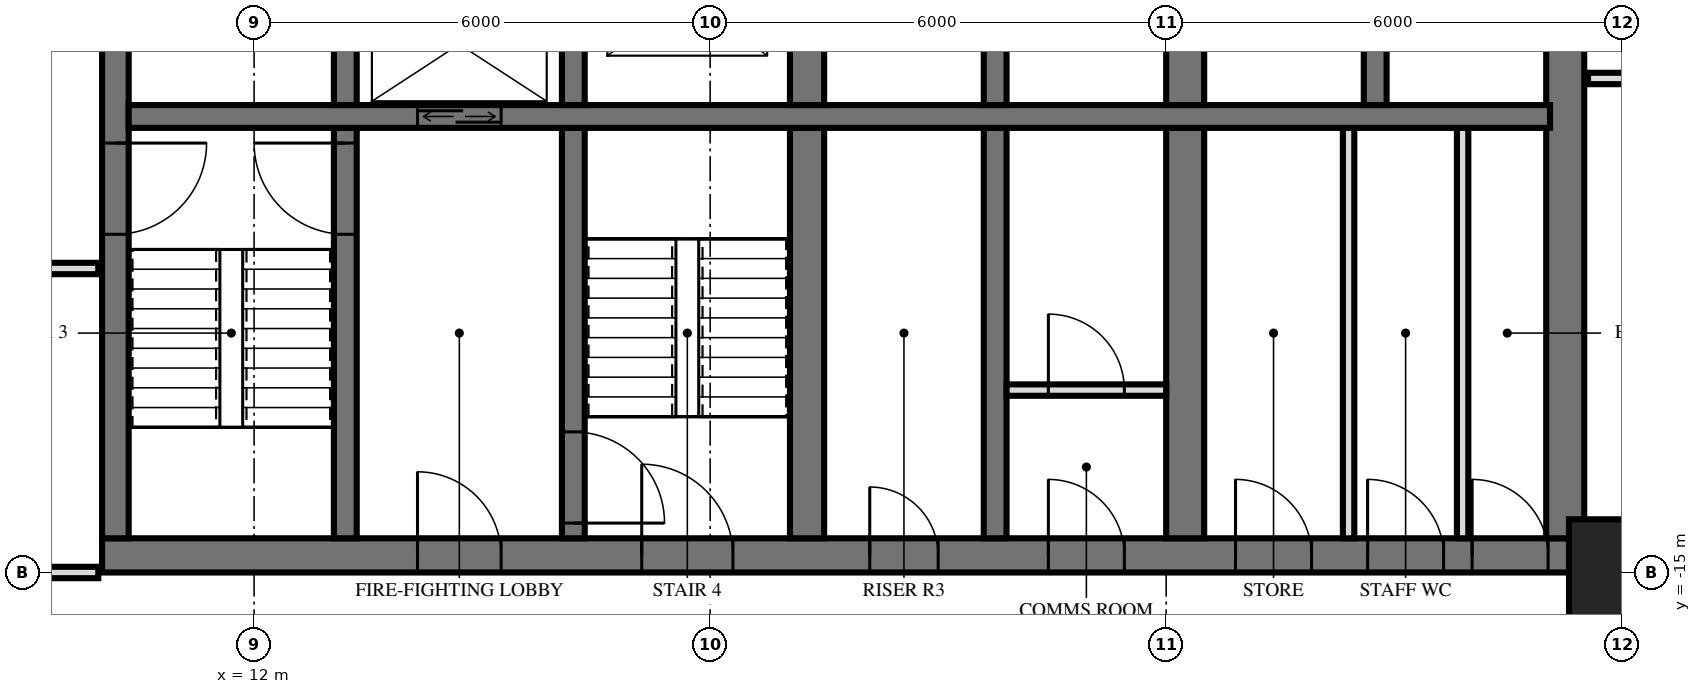
"""IFC4 building model, lengths in metres.
Left out: names, types, materials, properties, quantities, classifications, styles, units other than length and angle.
Written with IfcOpenShell. Run it as: python <this file> out.ifc"""

import sys

from ifc_helpers import new_model, si_unit, direction, frame, frame_2d, origin, origin_2d, place, context, subcontext, project, spatial, rectangle, extrude, element, fill, save


model = new_model("IFC4")
c1 = context("Model", 3, precision=1e-05, world=origin(), true_north=direction((0.0, 1.0)))
c2 = subcontext(c1, "Body", "Model", "MODEL_VIEW")
j1 = project(units=[si_unit("LENGTHUNIT", "METRE"), si_unit("PLANEANGLEUNIT", "RADIAN")], contexts=[c1])
p1 = place(None, origin())
s1 = spatial("IfcSite", under=j1, at=p1, CompositionType="ELEMENT")
p2 = place(p1, origin())
s2 = spatial("IfcBuilding", under=s1, at=p2, CompositionType="ELEMENT")
p3 = place(p2, frame((0.0, 0.0, 85.2)))
s3 = spatial("IfcBuildingStorey", under=s2, at=p3, CompositionType="ELEMENT", Elevation=85.2)
p4 = place(p3, frame((30.0, -15.0, 0.0), z_axis=(0.0, 0.0, 1.0), x_axis=(1.0, 0.0, 0.0)))
e1 = element("IfcColumn", 1, at=p4, inside=s3, PredefinedType="COLUMN", context=c2, shape_type="SweptSolid", body=[
    extrude(rectangle(XDim=1.4, YDim=1.4, at=origin_2d()), origin(), (0.0, 0.0, 1.0), 3.6),
])
p5 = place(p3, frame((10.0, -14.775, 0.0), z_axis=(0.0, 0.0, 1.0), x_axis=(1.0, 0.0, 0.0)))
e2 = element("IfcWall", 2, at=p5, inside=s3, PredefinedType="SHEAR", context=c2, shape_type="SweptSolid", body=[
    extrude(rectangle(XDim=19.5, YDim=0.45, at=frame_2d((9.75, 0.0))), origin(), (0.0, 0.0, 1.0), 3.6),
])
p6 = place(p5, frame((7.1, 0.0, 0.0)))
e3 = element("IfcOpeningElement", 3, at=p6, cuts=e2, PredefinedType="OPENING", context=c2, shape_type="SweptSolid", body=[
    extrude(rectangle(XDim=1.2, YDim=2.1, at=frame_2d((0.6, 1.05))), frame((0.0, 0.235, 0.0), z_axis=(0.0, -1.0, 0.0), x_axis=(1.0, 0.0, 0.0)), (0.0, 0.0, 1.0), 0.47),
])
p7 = place(p5, frame((4.15, 0.0, 0.0)))
e4 = element("IfcOpeningElement", 4, at=p7, cuts=e2, PredefinedType="OPENING", context=c2, shape_type="SweptSolid", body=[
    extrude(rectangle(XDim=1.1, YDim=2.1, at=frame_2d((0.55, 1.05))), frame((0.0, 0.235, 0.0), z_axis=(0.0, -1.0, 0.0), x_axis=(1.0, 0.0, 0.0)), (0.0, 0.0, 1.0), 0.47),
])
p8 = place(p5, frame((10.1, 0.0, 0.0)))
e5 = element("IfcOpeningElement", 5, at=p8, cuts=e2, PredefinedType="OPENING", context=c2, shape_type="SweptSolid", body=[
    extrude(rectangle(XDim=0.9, YDim=2.1, at=frame_2d((0.45, 1.05))), frame((0.0, 0.235, 0.0), z_axis=(0.0, -1.0, 0.0), x_axis=(1.0, 0.0, 0.0)), (0.0, 0.0, 1.0), 0.47),
])
p9 = place(p5, frame((12.45, 0.0, 0.0)))
e6 = element("IfcOpeningElement", 6, at=p9, cuts=e2, PredefinedType="OPENING", context=c2, shape_type="SweptSolid", body=[
    extrude(rectangle(XDim=1.0, YDim=2.1, at=frame_2d((0.5, 1.05))), frame((0.0, 0.235, 0.0), z_axis=(0.0, -1.0, 0.0), x_axis=(1.0, 0.0, 0.0)), (0.0, 0.0, 1.0), 0.47),
])
p10 = place(p5, frame((14.913, 0.0, 0.0)))
e7 = element("IfcOpeningElement", 7, at=p10, cuts=e2, PredefinedType="OPENING", context=c2, shape_type="SweptSolid", body=[
    extrude(rectangle(XDim=1.0, YDim=2.1, at=frame_2d((0.5, 1.05))), frame((0.0, 0.235, 0.0), z_axis=(0.0, -1.0, 0.0), x_axis=(1.0, 0.0, 0.0)), (0.0, 0.0, 1.0), 0.47),
])
p11 = place(p5, frame((16.65, 0.0, 0.0)))
e8 = element("IfcOpeningElement", 8, at=p11, cuts=e2, PredefinedType="OPENING", context=c2, shape_type="SweptSolid", body=[
    extrude(rectangle(XDim=1.0, YDim=2.1, at=frame_2d((0.5, 1.05))), frame((0.0, 0.235, 0.0), z_axis=(0.0, -1.0, 0.0), x_axis=(1.0, 0.0, 0.0)), (0.0, 0.0, 1.0), 0.47),
])
p12 = place(p5, frame((18.025, 0.0, 0.0)))
e9 = element("IfcOpeningElement", 9, at=p12, cuts=e2, PredefinedType="OPENING", context=c2, shape_type="SweptSolid", body=[
    extrude(rectangle(XDim=1.0, YDim=2.1, at=frame_2d((0.5, 1.05))), frame((0.0, 0.235, 0.0), z_axis=(0.0, -1.0, 0.0), x_axis=(1.0, 0.0, 0.0)), (0.0, 0.0, 1.0), 0.47),
])
p13 = place(p3, frame((10.175, -14.55, 0.0), z_axis=(0.0, 0.0, 1.0), x_axis=(0.0, 1.0, 0.0)))
e10 = element("IfcWall", 10, at=p13, inside=s3, PredefinedType="SHEAR", context=c2, shape_type="SweptSolid", body=[
    extrude(rectangle(XDim=14.1, YDim=0.35, at=frame_2d((7.05, 0.0))), origin(), (0.0, 0.0, 1.0), 3.6),
])
p14 = place(p13, frame((8.4, 0.0, 0.0)))
e11 = element("IfcOpeningElement", 11, at=p14, cuts=e10, PredefinedType="OPENING", context=c2, shape_type="SweptSolid", body=[
    extrude(rectangle(XDim=1.4, YDim=2.4, at=frame_2d((0.7, 1.2))), frame((0.0, 0.185, 0.0), z_axis=(0.0, -1.0, 0.0), x_axis=(1.0, 0.0, 0.0)), (0.0, 0.0, 1.0), 0.37),
])
p15 = place(p13, frame((10.0, 0.0, 0.0)))
e12 = element("IfcOpeningElement", 12, at=p15, cuts=e10, PredefinedType="OPENING", context=c2, shape_type="SweptSolid", body=[
    extrude(rectangle(XDim=1.4, YDim=2.4, at=frame_2d((0.7, 1.2))), frame((0.0, 0.185, 0.0), z_axis=(0.0, -1.0, 0.0), x_axis=(1.0, 0.0, 0.0)), (0.0, 0.0, 1.0), 0.37),
])
p16 = place(p13, frame((4.0, 0.0, 0.0)))
e13 = element("IfcOpeningElement", 13, at=p16, cuts=e10, PredefinedType="OPENING", context=c2, shape_type="SweptSolid", body=[
    extrude(rectangle(XDim=1.2, YDim=2.1, at=frame_2d((0.6, 1.05))), frame((0.0, 0.185, 0.0), z_axis=(0.0, -1.0, 0.0), x_axis=(1.0, 0.0, 0.0)), (0.0, 0.0, 1.0), 0.37),
])
p17 = place(p3, frame((29.25, -14.55, 0.0), z_axis=(0.0, 0.0, 1.0), x_axis=(0.0, 1.0, 0.0)))
e14 = element("IfcWall", 14, at=p17, inside=s3, PredefinedType="SHEAR", context=c2, shape_type="SweptSolid", body=[
    extrude(rectangle(XDim=14.1, YDim=0.5, at=frame_2d((7.05, 0.0))), origin(), (0.0, 0.0, 1.0), 3.6),
])
p18 = place(p3, frame((10.35, -9.0, 0.0), z_axis=(0.0, 0.0, 1.0), x_axis=(1.0, 0.0, 0.0)))
e15 = element("IfcWall", 15, at=p18, inside=s3, PredefinedType="SHEAR", context=c2, shape_type="SweptSolid", body=[
    extrude(rectangle(XDim=18.7, YDim=0.3, at=frame_2d((9.35, 0.0))), origin(), (0.0, 0.0, 1.0), 3.6),
])
p19 = place(p18, frame((3.8, 0.0, 0.0)))
e16 = element("IfcOpeningElement", 16, at=p19, cuts=e15, PredefinedType="OPENING", context=c2, shape_type="SweptSolid", body=[
    extrude(rectangle(XDim=1.1, YDim=2.1, at=frame_2d((0.55, 1.05))), frame((0.0, 0.16, 0.0), z_axis=(0.0, -1.0, 0.0), x_axis=(1.0, 0.0, 0.0)), (0.0, 0.0, 1.0), 0.32),
])
p20 = place(p3, frame((13.2, -8.85, 0.0), z_axis=(0.0, 0.0, 1.0), x_axis=(0.0, 1.0, 0.0)))
e17 = element("IfcWall", 17, at=p20, inside=s3, PredefinedType="SHEAR", context=c2, shape_type="SweptSolid", body=[
    extrude(rectangle(XDim=2.3, YDim=0.3, at=frame_2d((1.15, 0.0))), origin(), (0.0, 0.0, 1.0), 3.6),
])
p21 = place(p3, frame((13.2, -14.55, 0.0), z_axis=(0.0, 0.0, 1.0), x_axis=(0.0, 1.0, 0.0)))
e18 = element("IfcWall", 18, at=p21, inside=s3, PredefinedType="SHEAR", context=c2, shape_type="SweptSolid", body=[
    extrude(rectangle(XDim=5.4, YDim=0.3, at=frame_2d((2.7, 0.0))), origin(), (0.0, 0.0, 1.0), 3.6),
])
p22 = place(p21, frame((4.0, 0.0, 0.0)))
e19 = element("IfcOpeningElement", 19, at=p22, cuts=e18, PredefinedType="OPENING", context=c2, shape_type="SweptSolid", body=[
    extrude(rectangle(XDim=1.2, YDim=2.1, at=frame_2d((0.6, 1.05))), frame((0.0, 0.16, 0.0), z_axis=(0.0, -1.0, 0.0), x_axis=(1.0, 0.0, 0.0)), (0.0, 0.0, 1.0), 0.32),
])
p23 = place(p3, frame((16.2, -8.85, 0.0), z_axis=(0.0, 0.0, 1.0), x_axis=(0.0, 1.0, 0.0)))
e20 = element("IfcWall", 20, at=p23, inside=s3, PredefinedType="SHEAR", context=c2, shape_type="SweptSolid", body=[
    extrude(rectangle(XDim=2.3, YDim=0.3, at=frame_2d((1.15, 0.0))), origin(), (0.0, 0.0, 1.0), 3.6),
])
p24 = place(p3, frame((16.2, -14.55, 0.0), z_axis=(0.0, 0.0, 1.0), x_axis=(0.0, 1.0, 0.0)))
e21 = element("IfcWall", 21, at=p24, inside=s3, PredefinedType="SHEAR", context=c2, shape_type="SweptSolid", body=[
    extrude(rectangle(XDim=5.4, YDim=0.3, at=frame_2d((2.7, 0.0))), origin(), (0.0, 0.0, 1.0), 3.6),
])
p25 = place(p24, frame((0.2, 0.0, 0.0)))
e22 = element("IfcOpeningElement", 22, at=p25, cuts=e21, PredefinedType="OPENING", context=c2, shape_type="SweptSolid", body=[
    extrude(rectangle(XDim=1.2, YDim=2.1, at=frame_2d((0.6, 1.05))), frame((0.0, 0.16, 0.0), z_axis=(0.0, -1.0, 0.0), x_axis=(1.0, 0.0, 0.0)), (0.0, 0.0, 1.0), 0.32),
])
p26 = place(p3, frame((19.275, -8.85, 0.0), z_axis=(0.0, 0.0, 1.0), x_axis=(0.0, 1.0, 0.0)))
e23 = element("IfcWall", 23, at=p26, inside=s3, PredefinedType="SHEAR", context=c2, shape_type="SweptSolid", body=[
    extrude(rectangle(XDim=2.3, YDim=0.45, at=frame_2d((1.15, 0.0))), origin(), (0.0, 0.0, 1.0), 3.6),
])
p27 = place(p3, frame((19.275, -14.55, 0.0), z_axis=(0.0, 0.0, 1.0), x_axis=(0.0, 1.0, 0.0)))
e24 = element("IfcWall", 24, at=p27, inside=s3, PredefinedType="SHEAR", context=c2, shape_type="SweptSolid", body=[
    extrude(rectangle(XDim=5.4, YDim=0.45, at=frame_2d((2.7, 0.0))), origin(), (0.0, 0.0, 1.0), 3.6),
])
p28 = place(p3, frame((21.75, -8.85, 0.0), z_axis=(0.0, 0.0, 1.0), x_axis=(0.0, 1.0, 0.0)))
e25 = element("IfcWall", 25, at=p28, inside=s3, PredefinedType="SHEAR", context=c2, shape_type="SweptSolid", body=[
    extrude(rectangle(XDim=2.3, YDim=0.3, at=frame_2d((1.15, 0.0))), origin(), (0.0, 0.0, 1.0), 3.6),
])
p29 = place(p3, frame((21.75, -14.55, 0.0), z_axis=(0.0, 0.0, 1.0), x_axis=(0.0, 1.0, 0.0)))
e26 = element("IfcWall", 26, at=p29, inside=s3, PredefinedType="SHEAR", context=c2, shape_type="SweptSolid", body=[
    extrude(rectangle(XDim=5.4, YDim=0.3, at=frame_2d((2.7, 0.0))), origin(), (0.0, 0.0, 1.0), 3.6),
])
p30 = place(p3, frame((24.25, -8.85, 0.0), z_axis=(0.0, 0.0, 1.0), x_axis=(0.0, 1.0, 0.0)))
e27 = element("IfcWall", 27, at=p30, inside=s3, PredefinedType="SHEAR", context=c2, shape_type="SweptSolid", body=[
    extrude(rectangle(XDim=2.3, YDim=0.5, at=frame_2d((1.15, 0.0))), origin(), (0.0, 0.0, 1.0), 3.6),
])
p31 = place(p3, frame((24.25, -14.55, 0.0), z_axis=(0.0, 0.0, 1.0), x_axis=(0.0, 1.0, 0.0)))
e28 = element("IfcWall", 28, at=p31, inside=s3, PredefinedType="SHEAR", context=c2, shape_type="SweptSolid", body=[
    extrude(rectangle(XDim=5.4, YDim=0.5, at=frame_2d((2.7, 0.0))), origin(), (0.0, 0.0, 1.0), 3.6),
])
p32 = place(p3, frame((26.75, -8.85, 0.0), z_axis=(0.0, 0.0, 1.0), x_axis=(0.0, 1.0, 0.0)))
e29 = element("IfcWall", 29, at=p32, inside=s3, PredefinedType="SHEAR", context=c2, shape_type="SweptSolid", body=[
    extrude(rectangle(XDim=2.3, YDim=0.3, at=frame_2d((1.15, 0.0))), origin(), (0.0, 0.0, 1.0), 3.6),
])
p33 = place(p3, frame((21.9, -12.6, 0.0), z_axis=(0.0, 0.0, 1.0), x_axis=(1.0, 0.0, 0.0)))
e30 = element("IfcWall", 30, at=p33, inside=s3, PredefinedType="PARTITIONING", context=c2, shape_type="SweptSolid", body=[
    extrude(rectangle(XDim=2.1, YDim=0.15, at=frame_2d((1.05, 0.0))), origin(), (0.0, 0.0, 1.0), 3.3),
])
p34 = place(p33, frame((0.55, 0.0, 0.0)))
e31 = element("IfcOpeningElement", 31, at=p34, cuts=e30, PredefinedType="OPENING", context=c2, shape_type="SweptSolid", body=[
    extrude(rectangle(XDim=1.0, YDim=2.1, at=frame_2d((0.5, 1.05))), frame((0.0, 0.085, 0.0), z_axis=(0.0, -1.0, 0.0), x_axis=(1.0, 0.0, 0.0)), (0.0, 0.0, 1.0), 0.17),
])
for number, where, z_axis, x_axis in (
    (32, (26.4, -14.55, 0.0), (0.0, 0.0, 1.0), (0.0, 1.0, 0.0)),
    (33, (27.9, -14.55, 0.0), (0.0, 0.0, 1.0), (0.0, 1.0, 0.0)),
):
    element("IfcWall", number, at=place(p3, frame(where, z_axis=z_axis, x_axis=x_axis)), inside=s3, PredefinedType="PARTITIONING", context=c2, shape_type="SweptSolid", body=[
        extrude(rectangle(XDim=5.4, YDim=0.15, at=frame_2d((2.7, 0.0))), origin(), (0.0, 0.0, 1.0), 3.3),
    ])
p35 = place(p3, frame((-9.95, -15.0, 0.0), z_axis=(0.0, 0.0, 1.0), x_axis=(1.0, 0.0, 0.0)))
e34 = element("IfcWall", 34, at=p35, inside=s3, PredefinedType="PARTITIONING", context=c2, shape_type="SweptSolid", body=[
    extrude(rectangle(XDim=19.9, YDim=0.15, at=frame_2d((9.95, 0.0))), origin(), (0.0, 0.0, 1.0), 2.684),
])
p36 = place(p35, frame((9.45, 0.0, 0.0)))
e35 = element("IfcOpeningElement", 35, at=p36, cuts=e34, PredefinedType="OPENING", context=c2, shape_type="SweptSolid", body=[
    extrude(rectangle(XDim=1.0, YDim=2.1, at=frame_2d((0.5, 1.05))), frame((0.0, 0.085, 0.0), z_axis=(0.0, -1.0, 0.0), x_axis=(1.0, 0.0, 0.0)), (0.0, 0.0, 1.0), 0.17),
])
p37 = place(p3, frame((29.55, -15.0, 0.0), z_axis=(0.0, 0.0, 1.0), x_axis=(1.0, 0.0, 0.0)))
e36 = element("IfcWall", 36, at=p37, inside=s3, PredefinedType="PARTITIONING", context=c2, shape_type="SweptSolid", body=[
    extrude(rectangle(XDim=3.57, YDim=0.15, at=frame_2d((1.785, 0.0))), origin(), (0.0, 0.0, 1.0), 3.32),
])
p38 = place(p37, frame((1.205, 0.0, 0.0)))
e37 = element("IfcOpeningElement", 37, at=p38, cuts=e36, PredefinedType="OPENING", context=c2, shape_type="SweptSolid", body=[
    extrude(rectangle(XDim=0.8, YDim=2.1, at=frame_2d((0.4, 1.05))), frame((0.0, 0.085, 0.0), z_axis=(0.0, -1.0, 0.0), x_axis=(1.0, 0.0, 0.0)), (0.0, 0.0, 1.0), 0.17),
])
p39 = place(p3, frame((-9.95, -11.0, 0.0), z_axis=(0.0, 0.0, 1.0), x_axis=(1.0, 0.0, 0.0)))
e38 = element("IfcWall", 38, at=p39, inside=s3, PredefinedType="PARTITIONING", context=c2, shape_type="SweptSolid", body=[
    extrude(rectangle(XDim=19.9, YDim=0.15, at=frame_2d((9.95, 0.0))), origin(), (0.0, 0.0, 1.0), 3.32),
])
p40 = place(p39, frame((9.45, 0.0, 0.0)))
e39 = element("IfcOpeningElement", 39, at=p40, cuts=e38, PredefinedType="OPENING", context=c2, shape_type="SweptSolid", body=[
    extrude(rectangle(XDim=1.0, YDim=2.1, at=frame_2d((0.5, 1.05))), frame((0.0, 0.085, 0.0), z_axis=(0.0, -1.0, 0.0), x_axis=(1.0, 0.0, 0.0)), (0.0, 0.0, 1.0), 0.17),
])
p41 = place(p39, frame((3.45, 0.0, 0.0)))
e40 = element("IfcOpeningElement", 40, at=p41, cuts=e38, PredefinedType="OPENING", context=c2, shape_type="SweptSolid", body=[
    extrude(rectangle(XDim=1.0, YDim=2.1, at=frame_2d((0.5, 1.05))), frame((0.0, 0.085, 0.0), z_axis=(0.0, -1.0, 0.0), x_axis=(1.0, 0.0, 0.0)), (0.0, 0.0, 1.0), 0.17),
])
p42 = place(p3, frame((29.55, -8.5, 0.0), z_axis=(0.0, 0.0, 1.0), x_axis=(1.0, 0.0, 0.0)))
e41 = element("IfcWall", 41, at=p42, inside=s3, PredefinedType="PARTITIONING", context=c2, shape_type="SweptSolid", body=[
    extrude(rectangle(XDim=3.57, YDim=0.15, at=frame_2d((1.785, 0.0))), origin(), (0.0, 0.0, 1.0), 3.32),
])
p43 = place(p42, frame((1.4, 0.0, 0.0)))
e42 = element("IfcOpeningElement", 42, at=p43, cuts=e41, PredefinedType="OPENING", context=c2, shape_type="SweptSolid", body=[
    extrude(rectangle(XDim=0.9, YDim=2.1, at=frame_2d((0.45, 1.05))), frame((0.0, 0.085, 0.0), z_axis=(0.0, -1.0, 0.0), x_axis=(1.0, 0.0, 0.0)), (0.0, 0.0, 1.0), 0.17),
])
p44 = place(p19, origin())
e43 = element("IfcDoor", 43, at=p44, inside=s3, OperationType="DOUBLE_DOOR_SLIDING", PredefinedType="USERDEFINED", context=c2, shape_type="SweptSolid", body=[
    extrude(rectangle(XDim=1.1, YDim=2.1, at=frame_2d((0.55, 1.05))), frame((0.0, 0.025, 0.0), z_axis=(0.0, -1.0, 0.0), x_axis=(1.0, 0.0, 0.0)), (0.0, 0.0, 1.0), 0.05),
])
fill(e16, e43)
p45 = place(p16, frame((0.6, 0.0, 0.0), z_axis=(0.0, 0.0, 1.0), x_axis=(-1.0, 0.0, 0.0)))
e44 = element("IfcDoor", 44, at=p45, inside=s3, OperationType="SINGLE_SWING_RIGHT", PredefinedType="DOOR", context=c2, shape_type="SweptSolid", body=[
    extrude(rectangle(XDim=1.2, YDim=2.1, at=frame_2d((0.0, 1.05))), frame((0.0, -0.025, 0.0), z_axis=(0.0, 1.0, 0.0), x_axis=(-1.0, 0.0, 0.0)), (0.0, 0.0, 1.0), 0.05),
])
fill(e13, e44)
p46 = place(p6, origin())
e45 = element("IfcDoor", 45, at=p46, inside=s3, OperationType="SINGLE_SWING_RIGHT", PredefinedType="DOOR", context=c2, shape_type="SweptSolid", body=[
    extrude(rectangle(XDim=1.2, YDim=2.1, at=frame_2d((0.6, 1.05))), frame((0.0, 0.025, 0.0), z_axis=(0.0, -1.0, 0.0), x_axis=(1.0, 0.0, 0.0)), (0.0, 0.0, 1.0), 0.05),
])
fill(e3, e45)
p47 = place(p7, origin())
e46 = element("IfcDoor", 46, at=p47, inside=s3, OperationType="SINGLE_SWING_RIGHT", PredefinedType="DOOR", context=c2, shape_type="SweptSolid", body=[
    extrude(rectangle(XDim=1.1, YDim=2.1, at=frame_2d((0.55, 1.05))), frame((0.0, 0.025, 0.0), z_axis=(0.0, -1.0, 0.0), x_axis=(1.0, 0.0, 0.0)), (0.0, 0.0, 1.0), 0.05),
])
fill(e4, e46)
p48 = place(p8, origin())
e47 = element("IfcDoor", 47, at=p48, inside=s3, OperationType="SINGLE_SWING_RIGHT", PredefinedType="DOOR", context=c2, shape_type="SweptSolid", body=[
    extrude(rectangle(XDim=0.9, YDim=2.1, at=frame_2d((0.45, 1.05))), frame((0.0, 0.025, 0.0), z_axis=(0.0, -1.0, 0.0), x_axis=(1.0, 0.0, 0.0)), (0.0, 0.0, 1.0), 0.05),
])
fill(e5, e47)
p49 = place(p9, origin())
e48 = element("IfcDoor", 48, at=p49, inside=s3, OperationType="SINGLE_SWING_RIGHT", PredefinedType="DOOR", context=c2, shape_type="SweptSolid", body=[
    extrude(rectangle(XDim=1.0, YDim=2.1, at=frame_2d((0.5, 1.05))), frame((0.0, 0.025, 0.0), z_axis=(0.0, -1.0, 0.0), x_axis=(1.0, 0.0, 0.0)), (0.0, 0.0, 1.0), 0.05),
])
fill(e6, e48)
p50 = place(p10, origin())
e49 = element("IfcDoor", 49, at=p50, inside=s3, OperationType="SINGLE_SWING_RIGHT", PredefinedType="DOOR", context=c2, shape_type="SweptSolid", body=[
    extrude(rectangle(XDim=1.0, YDim=2.1, at=frame_2d((0.5, 1.05))), frame((0.0, 0.025, 0.0), z_axis=(0.0, -1.0, 0.0), x_axis=(1.0, 0.0, 0.0)), (0.0, 0.0, 1.0), 0.05),
])
fill(e7, e49)
p51 = place(p11, origin())
e50 = element("IfcDoor", 50, at=p51, inside=s3, OperationType="SINGLE_SWING_RIGHT", PredefinedType="DOOR", context=c2, shape_type="SweptSolid", body=[
    extrude(rectangle(XDim=1.0, YDim=2.1, at=frame_2d((0.5, 1.05))), frame((0.0, 0.025, 0.0), z_axis=(0.0, -1.0, 0.0), x_axis=(1.0, 0.0, 0.0)), (0.0, 0.0, 1.0), 0.05),
])
fill(e8, e50)
p52 = place(p12, origin())
e51 = element("IfcDoor", 51, at=p52, inside=s3, OperationType="SINGLE_SWING_RIGHT", PredefinedType="DOOR", context=c2, shape_type="SweptSolid", body=[
    extrude(rectangle(XDim=1.0, YDim=2.1, at=frame_2d((0.5, 1.05))), frame((0.0, 0.025, 0.0), z_axis=(0.0, -1.0, 0.0), x_axis=(1.0, 0.0, 0.0)), (0.0, 0.0, 1.0), 0.05),
])
fill(e9, e51)
p53 = place(p22, origin())
e52 = element("IfcDoor", 52, at=p53, inside=s3, OperationType="SINGLE_SWING_LEFT", PredefinedType="DOOR", context=c2, shape_type="SweptSolid", body=[
    extrude(rectangle(XDim=1.2, YDim=2.1, at=frame_2d((0.6, 1.05))), frame((0.0, 0.025, 0.0), z_axis=(0.0, -1.0, 0.0), x_axis=(1.0, 0.0, 0.0)), (0.0, 0.0, 1.0), 0.05),
])
fill(e19, e52)
p54 = place(p25, frame((0.6, 0.0, 0.0), z_axis=(0.0, 0.0, 1.0), x_axis=(-1.0, 0.0, 0.0)))
e53 = element("IfcDoor", 53, at=p54, inside=s3, OperationType="SINGLE_SWING_LEFT", PredefinedType="DOOR", context=c2, shape_type="SweptSolid", body=[
    extrude(rectangle(XDim=1.2, YDim=2.1, at=frame_2d((0.0, 1.05))), frame((0.0, -0.025, 0.0), z_axis=(0.0, 1.0, 0.0), x_axis=(-1.0, 0.0, 0.0)), (0.0, 0.0, 1.0), 0.05),
])
fill(e22, e53)
p55 = place(p34, origin())
e54 = element("IfcDoor", 54, at=p55, inside=s3, OperationType="SINGLE_SWING_RIGHT", PredefinedType="DOOR", context=c2, shape_type="SweptSolid", body=[
    extrude(rectangle(XDim=1.0, YDim=2.1, at=frame_2d((0.5, 1.05))), frame((0.0, 0.025, 0.0), z_axis=(0.0, -1.0, 0.0), x_axis=(1.0, 0.0, 0.0)), (0.0, 0.0, 1.0), 0.05),
])
fill(e31, e54)
save(model, sys.argv[1])
